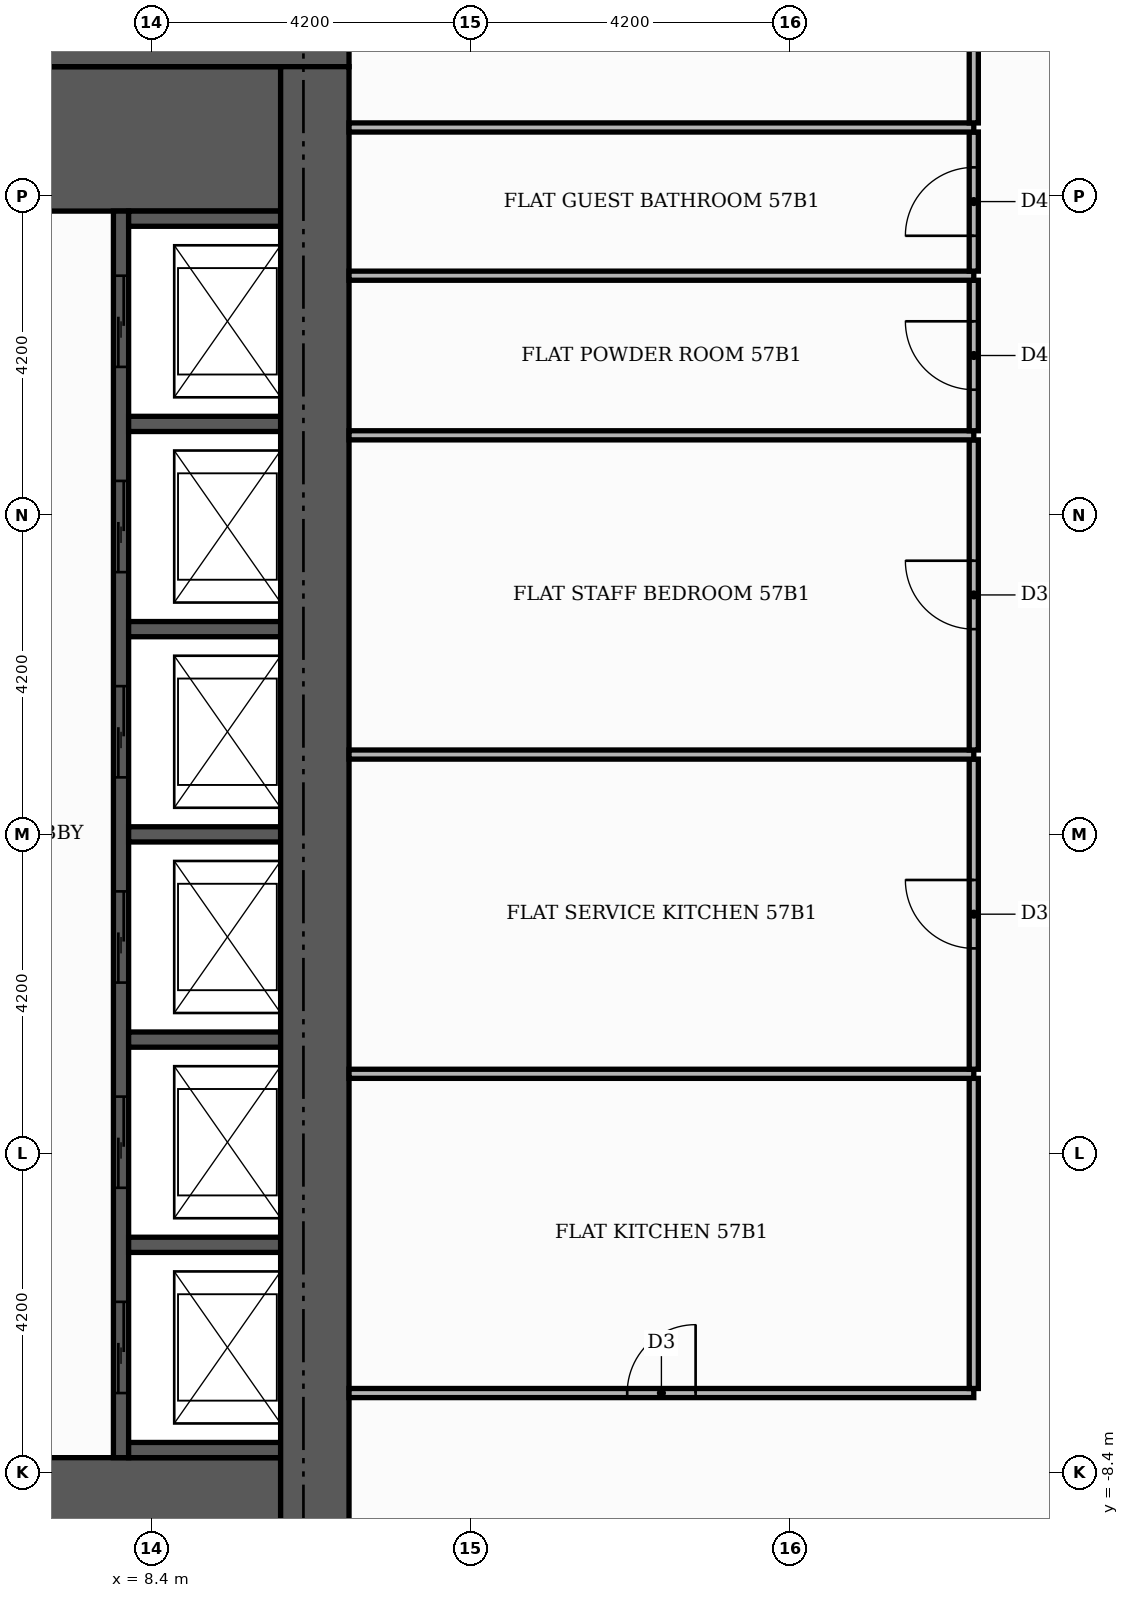
"""IFC4 building model, lengths in metres.
Left out: names, types, materials, properties, quantities, classifications, styles, units other than length and angle.
Written with IfcOpenShell. Run it as: python <this file> out.ifc"""

import sys

from ifc_helpers import new_model, si_unit, direction, frame, frame_2d, origin, place, context, subcontext, project, spatial, rectangle, extrude, element, fill, save


model = new_model("IFC4")
c1 = context("Model", 3, precision=1e-05, world=origin(), true_north=direction((0.0, 1.0)))
c2 = subcontext(c1, "Body", "Model", "MODEL_VIEW")
j1 = project(units=[si_unit("LENGTHUNIT", "METRE"), si_unit("PLANEANGLEUNIT", "RADIAN")], contexts=[c1])
p1 = place(None, origin())
s1 = spatial("IfcSite", under=j1, at=p1, CompositionType="ELEMENT")
p2 = place(p1, origin())
s2 = spatial("IfcBuilding", under=s1, at=p2, CompositionType="ELEMENT")
p3 = place(p2, frame((0.0, 0.0, 240.6)))
s3 = spatial("IfcBuildingStorey", under=s2, at=p3, CompositionType="ELEMENT", Elevation=240.6)
for number, where, z_axis, x_axis in (
    (1, (5.5, -9.15, 0.0), (0.0, 0.0, 1.0), (1.0, 0.0, 0.0)),
    (2, (5.5, 9.15, 0.0), (0.0, 0.0, 1.0), (1.0, 0.0, 0.0)),
):
    element("IfcWall", number, at=place(p3, frame(where, z_axis=z_axis, x_axis=x_axis)), inside=s3, PredefinedType="SHEAR", context=c2, shape_type="SweptSolid", body=[
        extrude(rectangle(XDim=4.6, YDim=1.9, at=frame_2d((2.3, 0.0))), origin(), (0.0, 0.0, 1.0), 3.48),
    ])
p4 = place(p3, frame((8.0, -8.2, 0.0), z_axis=(0.0, 0.0, 1.0), x_axis=(0.0, 1.0, 0.0)))
e3 = element("IfcWall", 3, at=p4, inside=s3, PredefinedType="SHEAR", context=c2, shape_type="SweptSolid", body=[
    extrude(rectangle(XDim=16.4, YDim=0.2, at=frame_2d((8.2, 0.0))), origin(), (0.0, 0.0, 1.0), 3.48),
])
p5 = place(p4, frame((0.85, 0.0, 0.0)))
e4 = element("IfcOpeningElement", 4, at=p5, cuts=e3, PredefinedType="OPENING", context=c2, shape_type="SweptSolid", body=[
    extrude(rectangle(XDim=1.2, YDim=2.1, at=frame_2d((0.6, 1.05))), frame((0.0, 0.11, 0.0), z_axis=(0.0, -1.0, 0.0), x_axis=(1.0, 0.0, 0.0)), (0.0, 0.0, 1.0), 0.22),
])
p6 = place(p4, frame((3.55, 0.0, 0.0)))
e5 = element("IfcOpeningElement", 5, at=p6, cuts=e3, PredefinedType="OPENING", context=c2, shape_type="SweptSolid", body=[
    extrude(rectangle(XDim=1.2, YDim=2.1, at=frame_2d((0.6, 1.05))), frame((0.0, 0.11, 0.0), z_axis=(0.0, -1.0, 0.0), x_axis=(1.0, 0.0, 0.0)), (0.0, 0.0, 1.0), 0.22),
])
p7 = place(p4, frame((6.25, 0.0, 0.0)))
e6 = element("IfcOpeningElement", 6, at=p7, cuts=e3, PredefinedType="OPENING", context=c2, shape_type="SweptSolid", body=[
    extrude(rectangle(XDim=1.2, YDim=2.1, at=frame_2d((0.6, 1.05))), frame((0.0, 0.11, 0.0), z_axis=(0.0, -1.0, 0.0), x_axis=(1.0, 0.0, 0.0)), (0.0, 0.0, 1.0), 0.22),
])
p8 = place(p4, frame((8.95, 0.0, 0.0)))
e7 = element("IfcOpeningElement", 7, at=p8, cuts=e3, PredefinedType="OPENING", context=c2, shape_type="SweptSolid", body=[
    extrude(rectangle(XDim=1.2, YDim=2.1, at=frame_2d((0.6, 1.05))), frame((0.0, 0.11, 0.0), z_axis=(0.0, -1.0, 0.0), x_axis=(1.0, 0.0, 0.0)), (0.0, 0.0, 1.0), 0.22),
])
p9 = place(p4, frame((11.65, 0.0, 0.0)))
e8 = element("IfcOpeningElement", 8, at=p9, cuts=e3, PredefinedType="OPENING", context=c2, shape_type="SweptSolid", body=[
    extrude(rectangle(XDim=1.2, YDim=2.1, at=frame_2d((0.6, 1.05))), frame((0.0, 0.11, 0.0), z_axis=(0.0, -1.0, 0.0), x_axis=(1.0, 0.0, 0.0)), (0.0, 0.0, 1.0), 0.22),
])
p10 = place(p4, frame((14.35, 0.0, 0.0)))
e9 = element("IfcOpeningElement", 9, at=p10, cuts=e3, PredefinedType="OPENING", context=c2, shape_type="SweptSolid", body=[
    extrude(rectangle(XDim=1.2, YDim=2.1, at=frame_2d((0.6, 1.05))), frame((0.0, 0.11, 0.0), z_axis=(0.0, -1.0, 0.0), x_axis=(1.0, 0.0, 0.0)), (0.0, 0.0, 1.0), 0.22),
])
for number, where, z_axis, x_axis in (
    (10, (8.1, -8.1, 0.0), (0.0, 0.0, 1.0), (1.0, 0.0, 0.0)),
    (11, (8.1, -5.4, 0.0), (0.0, 0.0, 1.0), (1.0, 0.0, 0.0)),
    (12, (8.1, -2.7, 0.0), (0.0, 0.0, 1.0), (1.0, 0.0, 0.0)),
    (13, (8.1, 0.0, 0.0), (0.0, 0.0, 1.0), (1.0, 0.0, 0.0)),
    (14, (8.1, 2.7, 0.0), (0.0, 0.0, 1.0), (1.0, 0.0, 0.0)),
    (15, (8.1, 5.4, 0.0), (0.0, 0.0, 1.0), (1.0, 0.0, 0.0)),
    (16, (8.1, 8.1, 0.0), (0.0, 0.0, 1.0), (1.0, 0.0, 0.0)),
):
    element("IfcWall", number, at=place(p3, frame(where, z_axis=z_axis, x_axis=x_axis)), inside=s3, PredefinedType="SHEAR", context=c2, shape_type="SweptSolid", body=[
        extrude(rectangle(XDim=2.0, YDim=0.2, at=frame_2d((1.0, 0.0))), origin(), (0.0, 0.0, 1.0), 3.48),
    ])
p11 = place(p3, frame((-11.0, 10.55, 0.0), z_axis=(0.0, 0.0, 1.0), x_axis=(1.0, 0.0, 0.0)))
e17 = element("IfcWall", 17, at=p11, inside=s3, PredefinedType="SHEAR", context=c2, shape_type="SweptSolid", body=[
    extrude(rectangle(XDim=22.0, YDim=0.9, at=frame_2d((11.0, 0.0))), origin(), (0.0, 0.0, 1.0), 3.48),
])
p12 = place(p11, frame((13.3, 0.0, 0.0)))
e18 = element("IfcOpeningElement", 18, at=p12, cuts=e17, PredefinedType="OPENING", context=c2, shape_type="SweptSolid", body=[
    extrude(rectangle(XDim=1.8, YDim=2.2, at=frame_2d((0.9, 1.1))), frame((0.0, 0.46, 0.0), z_axis=(0.0, -1.0, 0.0), x_axis=(1.0, 0.0, 0.0)), (0.0, 0.0, 1.0), 0.92),
])
p13 = place(p3, frame((10.55, -10.1, 0.0), z_axis=(0.0, 0.0, 1.0), x_axis=(0.0, 1.0, 0.0)))
e19 = element("IfcWall", 19, at=p13, inside=s3, PredefinedType="SHEAR", context=c2, shape_type="SweptSolid", body=[
    extrude(rectangle(XDim=20.2, YDim=0.9, at=frame_2d((10.1, 0.0))), origin(), (0.0, 0.0, 1.0), 3.48),
])
p14 = place(p3, frame((11.0, -7.35, 0.0), z_axis=(0.0, 0.0, 1.0), x_axis=(1.0, 0.0, 0.0)))
e20 = element("IfcWall", 20, at=p14, inside=s3, PredefinedType="PARTITIONING", context=c2, shape_type="SweptSolid", body=[
    extrude(rectangle(XDim=8.22, YDim=0.12, at=frame_2d((4.11, 0.0))), origin(), (0.0, 0.0, 1.0), 3.48),
])
p15 = place(p14, frame((3.66, 0.0, 0.0)))
e21 = element("IfcOpeningElement", 21, at=p15, cuts=e20, PredefinedType="OPENING", context=c2, shape_type="SweptSolid", body=[
    extrude(rectangle(XDim=0.9, YDim=2.1, at=frame_2d((0.45, 1.05))), frame((0.0, 0.07, 0.0), z_axis=(0.0, -1.0, 0.0), x_axis=(1.0, 0.0, 0.0)), (0.0, 0.0, 1.0), 0.14),
])
p16 = place(p3, frame((19.22, -7.29, 0.0), z_axis=(0.0, 0.0, 1.0), x_axis=(0.0, 1.0, 0.0)))
e22 = element("IfcWall", 22, at=p16, inside=s3, PredefinedType="PARTITIONING", context=c2, shape_type="SweptSolid", body=[
    extrude(rectangle(XDim=4.08, YDim=0.12, at=frame_2d((2.04, 0.0))), origin(), (0.0, 0.0, 1.0), 3.48),
])
p17 = place(p3, frame((11.0, -3.15, 0.0), z_axis=(0.0, 0.0, 1.0), x_axis=(1.0, 0.0, 0.0)))
e23 = element("IfcWall", 23, at=p17, inside=s3, PredefinedType="PARTITIONING", context=c2, shape_type="SweptSolid", body=[
    extrude(rectangle(XDim=8.22, YDim=0.12, at=frame_2d((4.11, 0.0))), origin(), (0.0, 0.0, 1.0), 3.48),
])
p18 = place(p3, frame((19.22, -3.09, 0.0), z_axis=(0.0, 0.0, 1.0), x_axis=(0.0, 1.0, 0.0)))
e24 = element("IfcWall", 24, at=p18, inside=s3, PredefinedType="PARTITIONING", context=c2, shape_type="SweptSolid", body=[
    extrude(rectangle(XDim=4.08, YDim=0.12, at=frame_2d((2.04, 0.0))), origin(), (0.0, 0.0, 1.0), 3.48),
])
p19 = place(p18, frame((1.59, 0.0, 0.0)))
e25 = element("IfcOpeningElement", 25, at=p19, cuts=e24, PredefinedType="OPENING", context=c2, shape_type="SweptSolid", body=[
    extrude(rectangle(XDim=0.9, YDim=2.1, at=frame_2d((0.45, 1.05))), frame((0.0, 0.07, 0.0), z_axis=(0.0, -1.0, 0.0), x_axis=(1.0, 0.0, 0.0)), (0.0, 0.0, 1.0), 0.14),
])
p20 = place(p3, frame((11.0, 1.05, 0.0), z_axis=(0.0, 0.0, 1.0), x_axis=(1.0, 0.0, 0.0)))
e26 = element("IfcWall", 26, at=p20, inside=s3, PredefinedType="PARTITIONING", context=c2, shape_type="SweptSolid", body=[
    extrude(rectangle(XDim=8.22, YDim=0.12, at=frame_2d((4.11, 0.0))), origin(), (0.0, 0.0, 1.0), 3.48),
])
p21 = place(p3, frame((19.22, 1.11, 0.0), z_axis=(0.0, 0.0, 1.0), x_axis=(0.0, 1.0, 0.0)))
e27 = element("IfcWall", 27, at=p21, inside=s3, PredefinedType="PARTITIONING", context=c2, shape_type="SweptSolid", body=[
    extrude(rectangle(XDim=4.08, YDim=0.12, at=frame_2d((2.04, 0.0))), origin(), (0.0, 0.0, 1.0), 3.48),
])
p22 = place(p21, frame((1.59, 0.0, 0.0)))
e28 = element("IfcOpeningElement", 28, at=p22, cuts=e27, PredefinedType="OPENING", context=c2, shape_type="SweptSolid", body=[
    extrude(rectangle(XDim=0.9, YDim=2.1, at=frame_2d((0.45, 1.05))), frame((0.0, 0.07, 0.0), z_axis=(0.0, -1.0, 0.0), x_axis=(1.0, 0.0, 0.0)), (0.0, 0.0, 1.0), 0.14),
])
p23 = place(p3, frame((11.0, 5.25, 0.0), z_axis=(0.0, 0.0, 1.0), x_axis=(1.0, 0.0, 0.0)))
e29 = element("IfcWall", 29, at=p23, inside=s3, PredefinedType="PARTITIONING", context=c2, shape_type="SweptSolid", body=[
    extrude(rectangle(XDim=8.22, YDim=0.12, at=frame_2d((4.11, 0.0))), origin(), (0.0, 0.0, 1.0), 3.48),
])
p24 = place(p3, frame((19.22, 5.31, 0.0), z_axis=(0.0, 0.0, 1.0), x_axis=(0.0, 1.0, 0.0)))
e30 = element("IfcWall", 30, at=p24, inside=s3, PredefinedType="PARTITIONING", context=c2, shape_type="SweptSolid", body=[
    extrude(rectangle(XDim=1.98, YDim=0.12, at=frame_2d((0.99, 0.0))), origin(), (0.0, 0.0, 1.0), 3.48),
])
p25 = place(p24, frame((0.54, 0.0, 0.0)))
e31 = element("IfcOpeningElement", 31, at=p25, cuts=e30, PredefinedType="OPENING", context=c2, shape_type="SweptSolid", body=[
    extrude(rectangle(XDim=0.9, YDim=2.1, at=frame_2d((0.45, 1.05))), frame((0.0, 0.07, 0.0), z_axis=(0.0, -1.0, 0.0), x_axis=(1.0, 0.0, 0.0)), (0.0, 0.0, 1.0), 0.14),
])
p26 = place(p3, frame((11.0, 7.35, 0.0), z_axis=(0.0, 0.0, 1.0), x_axis=(1.0, 0.0, 0.0)))
e32 = element("IfcWall", 32, at=p26, inside=s3, PredefinedType="PARTITIONING", context=c2, shape_type="SweptSolid", body=[
    extrude(rectangle(XDim=8.22, YDim=0.12, at=frame_2d((4.11, 0.0))), origin(), (0.0, 0.0, 1.0), 3.48),
])
p27 = place(p3, frame((19.22, 7.41, 0.0), z_axis=(0.0, 0.0, 1.0), x_axis=(0.0, 1.0, 0.0)))
e33 = element("IfcWall", 33, at=p27, inside=s3, PredefinedType="PARTITIONING", context=c2, shape_type="SweptSolid", body=[
    extrude(rectangle(XDim=1.83, YDim=0.12, at=frame_2d((0.915, 0.0))), origin(), (0.0, 0.0, 1.0), 3.48),
])
p28 = place(p27, frame((0.465, 0.0, 0.0)))
e34 = element("IfcOpeningElement", 34, at=p28, cuts=e33, PredefinedType="OPENING", context=c2, shape_type="SweptSolid", body=[
    extrude(rectangle(XDim=0.9, YDim=2.1, at=frame_2d((0.45, 1.05))), frame((0.0, 0.07, 0.0), z_axis=(0.0, -1.0, 0.0), x_axis=(1.0, 0.0, 0.0)), (0.0, 0.0, 1.0), 0.14),
])
p29 = place(p3, frame((11.0, 9.3, 0.0), z_axis=(0.0, 0.0, 1.0), x_axis=(1.0, 0.0, 0.0)))
e35 = element("IfcWall", 35, at=p29, inside=s3, PredefinedType="PARTITIONING", context=c2, shape_type="SweptSolid", body=[
    extrude(rectangle(XDim=8.22, YDim=0.12, at=frame_2d((4.11, 0.0))), origin(), (0.0, 0.0, 1.0), 3.48),
])
p30 = place(p3, frame((19.22, 9.36, 0.0), z_axis=(0.0, 0.0, 1.0), x_axis=(0.0, 1.0, 0.0)))
e36 = element("IfcWall", 36, at=p30, inside=s3, PredefinedType="PARTITIONING", context=c2, shape_type="SweptSolid", body=[
    extrude(rectangle(XDim=4.19, YDim=0.12, at=frame_2d((2.095, 0.0))), origin(), (0.0, 0.0, 1.0), 3.48),
])
p31 = place(p30, frame((1.665, 0.0, 0.0)))
e37 = element("IfcOpeningElement", 37, at=p31, cuts=e36, PredefinedType="OPENING", context=c2, shape_type="SweptSolid", body=[
    extrude(rectangle(XDim=0.9, YDim=2.1, at=frame_2d((0.45, 1.05))), frame((0.0, 0.07, 0.0), z_axis=(0.0, -1.0, 0.0), x_axis=(1.0, 0.0, 0.0)), (0.0, 0.0, 1.0), 0.14),
])
p32 = place(p5, origin())
e38 = element("IfcDoor", 38, at=p32, inside=s3, OperationType="SLIDING_TO_LEFT", PredefinedType="DOOR", context=c2, shape_type="SweptSolid", body=[
    extrude(rectangle(XDim=1.2, YDim=2.1, at=frame_2d((0.6, 1.05))), frame((0.0, 0.025, 0.0), z_axis=(0.0, -1.0, 0.0), x_axis=(1.0, 0.0, 0.0)), (0.0, 0.0, 1.0), 0.05),
])
fill(e4, e38)
p33 = place(p6, origin())
e39 = element("IfcDoor", 39, at=p33, inside=s3, OperationType="SLIDING_TO_LEFT", PredefinedType="DOOR", context=c2, shape_type="SweptSolid", body=[
    extrude(rectangle(XDim=1.2, YDim=2.1, at=frame_2d((0.6, 1.05))), frame((0.0, 0.025, 0.0), z_axis=(0.0, -1.0, 0.0), x_axis=(1.0, 0.0, 0.0)), (0.0, 0.0, 1.0), 0.05),
])
fill(e5, e39)
p34 = place(p7, origin())
e40 = element("IfcDoor", 40, at=p34, inside=s3, OperationType="SLIDING_TO_LEFT", PredefinedType="DOOR", context=c2, shape_type="SweptSolid", body=[
    extrude(rectangle(XDim=1.2, YDim=2.1, at=frame_2d((0.6, 1.05))), frame((0.0, 0.025, 0.0), z_axis=(0.0, -1.0, 0.0), x_axis=(1.0, 0.0, 0.0)), (0.0, 0.0, 1.0), 0.05),
])
fill(e6, e40)
p35 = place(p8, origin())
e41 = element("IfcDoor", 41, at=p35, inside=s3, OperationType="SLIDING_TO_LEFT", PredefinedType="DOOR", context=c2, shape_type="SweptSolid", body=[
    extrude(rectangle(XDim=1.2, YDim=2.1, at=frame_2d((0.6, 1.05))), frame((0.0, 0.025, 0.0), z_axis=(0.0, -1.0, 0.0), x_axis=(1.0, 0.0, 0.0)), (0.0, 0.0, 1.0), 0.05),
])
fill(e7, e41)
p36 = place(p9, origin())
e42 = element("IfcDoor", 42, at=p36, inside=s3, OperationType="SLIDING_TO_LEFT", PredefinedType="DOOR", context=c2, shape_type="SweptSolid", body=[
    extrude(rectangle(XDim=1.2, YDim=2.1, at=frame_2d((0.6, 1.05))), frame((0.0, 0.025, 0.0), z_axis=(0.0, -1.0, 0.0), x_axis=(1.0, 0.0, 0.0)), (0.0, 0.0, 1.0), 0.05),
])
fill(e8, e42)
p37 = place(p10, origin())
e43 = element("IfcDoor", 43, at=p37, inside=s3, OperationType="SLIDING_TO_LEFT", PredefinedType="DOOR", context=c2, shape_type="SweptSolid", body=[
    extrude(rectangle(XDim=1.2, YDim=2.1, at=frame_2d((0.6, 1.05))), frame((0.0, 0.025, 0.0), z_axis=(0.0, -1.0, 0.0), x_axis=(1.0, 0.0, 0.0)), (0.0, 0.0, 1.0), 0.05),
])
fill(e9, e43)
p38 = place(p15, origin())
e44 = element("IfcDoor", 44, at=p38, inside=s3, OperationType="SINGLE_SWING_RIGHT", PredefinedType="DOOR", context=c2, shape_type="SweptSolid", body=[
    extrude(rectangle(XDim=0.9, YDim=2.1, at=frame_2d((0.45, 1.05))), frame((0.0, 0.025, 0.0), z_axis=(0.0, -1.0, 0.0), x_axis=(1.0, 0.0, 0.0)), (0.0, 0.0, 1.0), 0.05),
])
fill(e21, e44)
p39 = place(p19, origin())
e45 = element("IfcDoor", 45, at=p39, inside=s3, OperationType="SINGLE_SWING_RIGHT", PredefinedType="DOOR", context=c2, shape_type="SweptSolid", body=[
    extrude(rectangle(XDim=0.9, YDim=2.1, at=frame_2d((0.45, 1.05))), frame((0.0, 0.025, 0.0), z_axis=(0.0, -1.0, 0.0), x_axis=(1.0, 0.0, 0.0)), (0.0, 0.0, 1.0), 0.05),
])
fill(e25, e45)
p40 = place(p22, origin())
e46 = element("IfcDoor", 46, at=p40, inside=s3, OperationType="SINGLE_SWING_RIGHT", PredefinedType="DOOR", context=c2, shape_type="SweptSolid", body=[
    extrude(rectangle(XDim=0.9, YDim=2.1, at=frame_2d((0.45, 1.05))), frame((0.0, 0.025, 0.0), z_axis=(0.0, -1.0, 0.0), x_axis=(1.0, 0.0, 0.0)), (0.0, 0.0, 1.0), 0.05),
])
fill(e28, e46)
p41 = place(p25, origin())
e47 = element("IfcDoor", 47, at=p41, inside=s3, OperationType="SINGLE_SWING_RIGHT", PredefinedType="DOOR", context=c2, shape_type="SweptSolid", body=[
    extrude(rectangle(XDim=0.9, YDim=2.1, at=frame_2d((0.45, 1.05))), frame((0.0, 0.025, 0.0), z_axis=(0.0, -1.0, 0.0), x_axis=(1.0, 0.0, 0.0)), (0.0, 0.0, 1.0), 0.05),
])
fill(e31, e47)
p42 = place(p28, origin())
e48 = element("IfcDoor", 48, at=p42, inside=s3, OperationType="SINGLE_SWING_LEFT", PredefinedType="DOOR", context=c2, shape_type="SweptSolid", body=[
    extrude(rectangle(XDim=0.9, YDim=2.1, at=frame_2d((0.45, 1.05))), frame((0.0, 0.025, 0.0), z_axis=(0.0, -1.0, 0.0), x_axis=(1.0, 0.0, 0.0)), (0.0, 0.0, 1.0), 0.05),
])
fill(e34, e48)
save(model, sys.argv[1])
